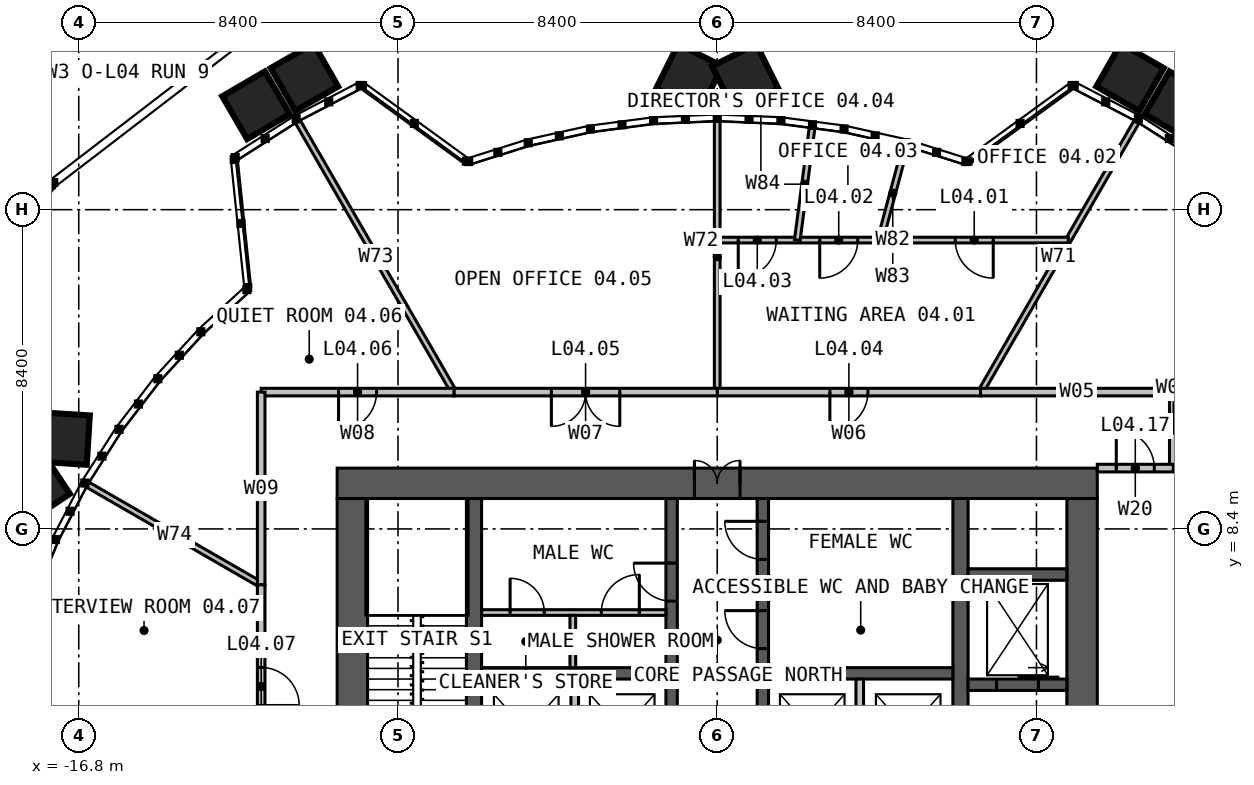
"""IFC4 building model, lengths in metres.
Left out: names, types, materials, properties, quantities, classifications, styles, units other than length and angle.
Written with IfcOpenShell. Run it as: python <this file> out.ifc"""

import sys

from ifc_helpers import new_model, si_unit, direction, frame, frame_2d, origin, place, context, subcontext, project, spatial, rectangle, extrude, element, fill, save


model = new_model("IFC4")
c1 = context("Model", 3, precision=1e-05, world=origin(), true_north=direction((0.0, 1.0)))
c2 = subcontext(c1, "Body", "Model", "MODEL_VIEW")
j1 = project(units=[si_unit("LENGTHUNIT", "METRE"), si_unit("PLANEANGLEUNIT", "RADIAN")], contexts=[c1])
p1 = place(None, origin())
s1 = spatial("IfcSite", under=j1, at=p1, CompositionType="ELEMENT")
p2 = place(p1, origin())
s2 = spatial("IfcBuilding", under=s1, at=p2, CompositionType="ELEMENT")
p3 = place(p2, frame((0.0, 0.0, 21.0)))
s3 = spatial("IfcBuildingStorey", under=s2, at=p3, CompositionType="ELEMENT", Elevation=21.0)
p4 = place(p3, frame((-10.0, 9.6, 0.0), z_axis=(0.0, 0.0, 1.0), x_axis=(1.0, 0.0, 0.0)))
e1 = element("IfcWall", 1, at=p4, inside=s3, PredefinedType="SOLIDWALL", context=c2, shape_type="SweptSolid", body=[
    extrude(rectangle(XDim=20.0, YDim=0.8, at=frame_2d((10.0, 0.0))), origin(), (0.0, 0.0, 1.0), 4.0),
])
p5 = place(p4, frame((9.4, 0.0, 0.0)))
e2 = element("IfcOpeningElement", 2, at=p5, cuts=e1, PredefinedType="OPENING", context=c2, shape_type="SweptSolid", body=[
    extrude(rectangle(XDim=1.2, YDim=2.2, at=frame_2d((0.6, 1.1))), frame((0.0, 0.41, 0.0), z_axis=(0.0, -1.0, 0.0), x_axis=(1.0, 0.0, 0.0)), (0.0, 0.0, 1.0), 0.82),
])
for number, where, z_axis, x_axis in (
    (3, (9.6, -9.2, 0.0), (0.0, 0.0, 1.0), (0.0, 1.0, 0.0)),
    (4, (-9.6, 9.2, 0.0), (0.0, 0.0, 1.0), (0.0, -1.0, 0.0)),
):
    element("IfcWall", number, at=place(p3, frame(where, z_axis=z_axis, x_axis=x_axis)), inside=s3, PredefinedType="SOLIDWALL", context=c2, shape_type="SweptSolid", body=[
        extrude(rectangle(XDim=18.4, YDim=0.8, at=frame_2d((9.2, 0.0))), origin(), (0.0, 0.0, 1.0), 4.0),
    ])
p6 = place(p3, frame((-6.4, -9.2, 0.0), z_axis=(0.0, 0.0, 1.0), x_axis=(0.0, 1.0, 0.0)))
e5 = element("IfcWall", 5, at=p6, inside=s3, PredefinedType="SOLIDWALL", context=c2, shape_type="SweptSolid", body=[
    extrude(rectangle(XDim=18.4, YDim=0.4, at=frame_2d((9.2, 0.0))), origin(), (0.0, 0.0, 1.0), 4.0),
])
p7 = place(p6, frame((8.7, 0.0, 0.0)))
e6 = element("IfcOpeningElement", 6, at=p7, cuts=e5, PredefinedType="OPENING", context=c2, shape_type="SweptSolid", body=[
    extrude(rectangle(XDim=1.0, YDim=2.2, at=frame_2d((0.5, 1.1))), frame((0.0, 0.21, 0.0), z_axis=(0.0, -1.0, 0.0), x_axis=(1.0, 0.0, 0.0)), (0.0, 0.0, 1.0), 0.42),
])
p8 = place(p3, frame((6.4, 9.2, 0.0), z_axis=(0.0, 0.0, 1.0), x_axis=(0.0, -1.0, 0.0)))
e7 = element("IfcWall", 7, at=p8, inside=s3, PredefinedType="SOLIDWALL", context=c2, shape_type="SweptSolid", body=[
    extrude(rectangle(XDim=18.4, YDim=0.4, at=frame_2d((9.2, 0.0))), origin(), (0.0, 0.0, 1.0), 4.0),
])
p9 = place(p8, frame((8.7, 0.0, 0.0)))
e8 = element("IfcOpeningElement", 8, at=p9, cuts=e7, PredefinedType="OPENING", context=c2, shape_type="SweptSolid", body=[
    extrude(rectangle(XDim=1.0, YDim=2.2, at=frame_2d((0.5, 1.1))), frame((0.0, 0.21, 0.0), z_axis=(0.0, -1.0, 0.0), x_axis=(1.0, 0.0, 0.0)), (0.0, 0.0, 1.0), 0.42),
])
for number, where, z_axis, x_axis in (
    (9, (-6.2, 4.6, 0.0), (0.0, 0.0, 1.0), (1.0, 0.0, 0.0)),
    (10, (1.35, 4.6, 0.0), (0.0, 0.0, 1.0), (1.0, 0.0, 0.0)),
):
    element("IfcWall", number, at=place(p3, frame(where, z_axis=z_axis, x_axis=x_axis)), inside=s3, PredefinedType="SOLIDWALL", context=c2, shape_type="SweptSolid", body=[
        extrude(rectangle(XDim=4.85, YDim=0.3, at=frame_2d((2.425, 0.0))), origin(), (0.0, 0.0, 1.0), 4.0),
    ])
p10 = place(p3, frame((-1.2, 1.45, 0.0), z_axis=(0.0, 0.0, 1.0), x_axis=(0.0, 1.0, 0.0)))
e11 = element("IfcWall", 11, at=p10, inside=s3, PredefinedType="SOLIDWALL", context=c2, shape_type="SweptSolid", body=[
    extrude(rectangle(XDim=7.75, YDim=0.3, at=frame_2d((3.875, 0.0))), origin(), (0.0, 0.0, 1.0), 4.0),
])
p11 = place(p10, frame((5.05, 0.0, 0.0)))
e12 = element("IfcOpeningElement", 12, at=p11, cuts=e11, PredefinedType="OPENING", context=c2, shape_type="SweptSolid", body=[
    extrude(rectangle(XDim=1.0, YDim=2.2, at=frame_2d((0.5, 1.1))), frame((0.0, 0.16, 0.0), z_axis=(0.0, -1.0, 0.0), x_axis=(1.0, 0.0, 0.0)), (0.0, 0.0, 1.0), 0.32),
])
p12 = place(p3, frame((1.2, 1.45, 0.0), z_axis=(0.0, 0.0, 1.0), x_axis=(0.0, 1.0, 0.0)))
e13 = element("IfcWall", 13, at=p12, inside=s3, PredefinedType="SOLIDWALL", context=c2, shape_type="SweptSolid", body=[
    extrude(rectangle(XDim=7.75, YDim=0.3, at=frame_2d((3.875, 0.0))), origin(), (0.0, 0.0, 1.0), 4.0),
])
p13 = place(p12, frame((3.8, 0.0, 0.0)))
e14 = element("IfcOpeningElement", 14, at=p13, cuts=e13, PredefinedType="OPENING", context=c2, shape_type="SweptSolid", body=[
    extrude(rectangle(XDim=1.0, YDim=2.2, at=frame_2d((0.5, 1.1))), frame((0.0, 0.16, 0.0), z_axis=(0.0, -1.0, 0.0), x_axis=(1.0, 0.0, 0.0)), (0.0, 0.0, 1.0), 0.32),
])
p14 = place(p12, frame((6.15, 0.0, 0.0)))
e15 = element("IfcOpeningElement", 15, at=p14, cuts=e13, PredefinedType="OPENING", context=c2, shape_type="SweptSolid", body=[
    extrude(rectangle(XDim=1.0, YDim=2.2, at=frame_2d((0.5, 1.1))), frame((0.0, 0.16, 0.0), z_axis=(0.0, -1.0, 0.0), x_axis=(1.0, 0.0, 0.0)), (0.0, 0.0, 1.0), 0.32),
])
p15 = place(p3, frame((6.6, 4.3, 0.0), z_axis=(0.0, 0.0, 1.0), x_axis=(1.0, 0.0, 0.0)))
e16 = element("IfcWall", 16, at=p15, inside=s3, PredefinedType="SOLIDWALL", context=c2, shape_type="SweptSolid", body=[
    extrude(rectangle(XDim=2.6, YDim=0.3, at=frame_2d((1.3, 0.0))), origin(), (0.0, 0.0, 1.0), 4.0),
])
p16 = place(p15, frame((0.75, 0.0, 0.0)))
e17 = element("IfcOpeningElement", 17, at=p16, cuts=e16, PredefinedType="OPENING", context=c2, shape_type="SweptSolid", body=[
    extrude(rectangle(XDim=1.1, YDim=2.2, at=frame_2d((0.55, 1.1))), frame((0.0, 0.16, 0.0), z_axis=(0.0, -1.0, 0.0), x_axis=(1.0, 0.0, 0.0)), (0.0, 0.0, 1.0), 0.32),
])
p17 = place(p3, frame((6.6, 7.2, 0.0), z_axis=(0.0, 0.0, 1.0), x_axis=(1.0, 0.0, 0.0)))
e18 = element("IfcWall", 18, at=p17, inside=s3, PredefinedType="SOLIDWALL", context=c2, shape_type="SweptSolid", body=[
    extrude(rectangle(XDim=2.6, YDim=0.3, at=frame_2d((1.3, 0.0))), origin(), (0.0, 0.0, 1.0), 4.0),
])
for number, where, z_axis, x_axis in (
    (19, (-3.75, 1.75, 0.0), (0.0, 0.0, 1.0), (0.0, 1.0, 0.0)),
    (20, (3.75, 1.75, 0.0), (0.0, 0.0, 1.0), (0.0, 1.0, 0.0)),
):
    element("IfcWall", number, at=place(p3, frame(where, z_axis=z_axis, x_axis=x_axis)), inside=s3, PredefinedType="SOLIDWALL", context=c2, shape_type="SweptSolid", body=[
        extrude(rectangle(XDim=2.7, YDim=0.2, at=frame_2d((1.35, 0.0))), origin(), (0.0, 0.0, 1.0), 3.75),
    ])
p18 = place(p3, frame((1.35, 6.8, 0.0), z_axis=(0.0, 0.0, 1.0), x_axis=(1.0, 0.0, 0.0)))
e21 = element("IfcWall", 21, at=p18, inside=s3, PredefinedType="PARTITIONING", context=c2, shape_type="SweptSolid", body=[
    extrude(rectangle(XDim=4.85, YDim=0.15, at=frame_2d((2.425, 0.0))), origin(), (0.0, 0.0, 1.0), 3.75),
])
p19 = place(p3, frame((-6.2, 6.2, 0.0), z_axis=(0.0, 0.0, 1.0), x_axis=(1.0, 0.0, 0.0)))
e22 = element("IfcWall", 22, at=p19, inside=s3, PredefinedType="PARTITIONING", context=c2, shape_type="SweptSolid", body=[
    extrude(rectangle(XDim=4.85, YDim=0.15, at=frame_2d((2.425, 0.0))), origin(), (0.0, 0.0, 1.0), 3.75),
])
p20 = place(p19, frame((3.15, 0.0, 0.0)))
e23 = element("IfcOpeningElement", 23, at=p20, cuts=e22, PredefinedType="OPENING", context=c2, shape_type="SweptSolid", body=[
    extrude(rectangle(XDim=1.0, YDim=2.2, at=frame_2d((0.5, 1.1))), frame((0.0, 0.085, 0.0), z_axis=(0.0, -1.0, 0.0), x_axis=(1.0, 0.0, 0.0)), (0.0, 0.0, 1.0), 0.17),
])
p21 = place(p19, frame((0.75, 0.0, 0.0)))
e24 = element("IfcOpeningElement", 24, at=p21, cuts=e22, PredefinedType="OPENING", context=c2, shape_type="SweptSolid", body=[
    extrude(rectangle(XDim=0.9, YDim=2.2, at=frame_2d((0.45, 1.1))), frame((0.0, 0.085, 0.0), z_axis=(0.0, -1.0, 0.0), x_axis=(1.0, 0.0, 0.0)), (0.0, 0.0, 1.0), 0.17),
])
p22 = place(p3, frame((-3.8, 4.75, 0.0), z_axis=(0.0, 0.0, 1.0), x_axis=(0.0, 1.0, 0.0)))
e25 = element("IfcWall", 25, at=p22, inside=s3, PredefinedType="PARTITIONING", context=c2, shape_type="SweptSolid", body=[
    extrude(rectangle(XDim=1.375, YDim=0.15, at=frame_2d((0.688, 0.0))), origin(), (0.0, 0.0, 1.0), 3.75),
])
p23 = place(p3, frame((6.928, 12.0, 0.0), z_axis=(0.0, 0.0, 1.0), x_axis=(0.499995243048, 0.866028150195, 0.0)))
e26 = element("IfcWall", 26, at=p23, inside=s3, PredefinedType="PARTITIONING", context=c2, shape_type="SweptSolid", body=[
    extrude(rectangle(XDim=8.212, YDim=0.15, at=frame_2d((4.106, 0.0))), origin(), (0.0, 0.0, 1.0), 2.79),
])
p24 = place(p3, frame((0.0, 12.0, 0.0), z_axis=(0.0, 0.0, 1.0), x_axis=(0.0, 1.0, 0.0)))
e27 = element("IfcWall", 27, at=p24, inside=s3, PredefinedType="PARTITIONING", context=c2, shape_type="SweptSolid", body=[
    extrude(rectangle(XDim=7.124, YDim=0.15, at=frame_2d((3.562, 0.0))), origin(), (0.0, 0.0, 1.0), 2.79),
])
p25 = place(p3, frame((-6.928, 12.0, 0.0), z_axis=(0.0, 0.0, 1.0), x_axis=(-0.499995243048, 0.866028150195, 0.0)))
e28 = element("IfcWall", 28, at=p25, inside=s3, PredefinedType="PARTITIONING", context=c2, shape_type="SweptSolid", body=[
    extrude(rectangle(XDim=8.212, YDim=0.15, at=frame_2d((4.106, 0.0))), origin(), (0.0, 0.0, 1.0), 2.79),
])
p26 = place(p3, frame((-12.0, 6.928, 0.0), z_axis=(0.0, 0.0, 1.0), x_axis=(-0.866029667373, 0.499992615176, 0.0)))
e29 = element("IfcWall", 29, at=p26, inside=s3, PredefinedType="PARTITIONING", context=c2, shape_type="SweptSolid", body=[
    extrude(rectangle(XDim=5.267, YDim=0.15, at=frame_2d((2.634, 0.0))), origin(), (0.0, 0.0, 1.0), 2.79),
])
p27 = place(p3, frame((12.0, 10.0, 0.0), z_axis=(0.0, 0.0, 1.0), x_axis=(0.0, 1.0, 0.0)))
e30 = element("IfcWall", 30, at=p27, inside=s3, PredefinedType="PARTITIONING", context=c2, shape_type="SweptSolid", body=[
    extrude(rectangle(XDim=2.0, YDim=0.2, at=frame_2d((1.0, 0.0))), origin(), (0.0, 0.0, 1.0), 3.8),
])
p28 = place(p3, frame((12.0, 12.0, 0.0), z_axis=(0.0, 0.0, 1.0), x_axis=(-1.0, 0.0, 0.0)))
e31 = element("IfcWall", 31, at=p28, inside=s3, PredefinedType="PARTITIONING", context=c2, shape_type="SweptSolid", body=[
    extrude(rectangle(XDim=5.072, YDim=0.2, at=frame_2d((2.536, 0.0))), origin(), (0.0, 0.0, 1.0), 3.8),
])
p29 = place(p3, frame((9.238, 16.0, 0.0), z_axis=(0.0, 0.0, 1.0), x_axis=(-1.0, 0.0, 0.0)))
e32 = element("IfcWall", 32, at=p29, inside=s3, PredefinedType="PARTITIONING", context=c2, shape_type="SweptSolid", body=[
    extrude(rectangle(XDim=9.238, YDim=0.15, at=frame_2d((4.619, 0.0))), origin(), (0.0, 0.0, 1.0), 2.79),
])
p30 = place(p29, frame((1.975, 0.0, 0.0)))
e33 = element("IfcOpeningElement", 33, at=p30, cuts=e32, PredefinedType="OPENING", context=c2, shape_type="SweptSolid", body=[
    extrude(rectangle(XDim=1.0, YDim=2.2, at=frame_2d((0.5, 1.1))), frame((0.0, 0.085, 0.0), z_axis=(0.0, -1.0, 0.0), x_axis=(1.0, 0.0, 0.0)), (0.0, 0.0, 1.0), 0.17),
])
p31 = place(p29, frame((5.541, 0.0, 0.0)))
e34 = element("IfcOpeningElement", 34, at=p31, cuts=e32, PredefinedType="OPENING", context=c2, shape_type="SweptSolid", body=[
    extrude(rectangle(XDim=1.0, YDim=2.2, at=frame_2d((0.5, 1.1))), frame((0.0, 0.085, 0.0), z_axis=(0.0, -1.0, 0.0), x_axis=(1.0, 0.0, 0.0)), (0.0, 0.0, 1.0), 0.17),
])
p32 = place(p29, frame((7.684, 0.0, 0.0)))
e35 = element("IfcOpeningElement", 35, at=p32, cuts=e32, PredefinedType="OPENING", context=c2, shape_type="SweptSolid", body=[
    extrude(rectangle(XDim=1.0, YDim=2.2, at=frame_2d((0.5, 1.1))), frame((0.0, 0.085, 0.0), z_axis=(0.0, -1.0, 0.0), x_axis=(1.0, 0.0, 0.0)), (0.0, 0.0, 1.0), 0.17),
])
p33 = place(p3, frame((4.287, 16.0, 0.0), z_axis=(0.0, 0.0, 1.0), x_axis=(0.258820329209, 0.965925482213, 0.0)))
e36 = element("IfcWall", 36, at=p33, inside=s3, PredefinedType="PARTITIONING", context=c2, shape_type="SweptSolid", body=[
    extrude(rectangle(XDim=2.559, YDim=0.15, at=frame_2d((1.28, 0.0))), origin(), (0.0, 0.0, 1.0), 2.79),
])
p34 = place(p3, frame((2.106, 16.0, 0.0), z_axis=(0.0, 0.0, 1.0), x_axis=(0.130492822968, 0.991449253948, 0.0)))
e37 = element("IfcWall", 37, at=p34, inside=s3, PredefinedType="PARTITIONING", context=c2, shape_type="SweptSolid", body=[
    extrude(rectangle(XDim=2.967, YDim=0.15, at=frame_2d((1.484, 0.0))), origin(), (0.0, 0.0, 1.0), 2.79),
])
p35 = place(p3, frame((6.928, 12.0, 0.0), z_axis=(0.0, 0.0, 1.0), x_axis=(-1.0, 0.0, 0.0)))
e38 = element("IfcWall", 38, at=p35, inside=s3, PredefinedType="PARTITIONING", context=c2, shape_type="SweptSolid", body=[
    extrude(rectangle(XDim=6.928, YDim=0.2, at=frame_2d((3.464, 0.0))), origin(), (0.0, 0.0, 1.0), 3.8),
])
p36 = place(p35, frame((2.964, 0.0, 0.0)))
e39 = element("IfcOpeningElement", 39, at=p36, cuts=e38, PredefinedType="OPENING", context=c2, shape_type="SweptSolid", body=[
    extrude(rectangle(XDim=1.0, YDim=2.2, at=frame_2d((0.5, 1.1))), frame((0.0, 0.11, 0.0), z_axis=(0.0, -1.0, 0.0), x_axis=(1.0, 0.0, 0.0)), (0.0, 0.0, 1.0), 0.22),
])
p37 = place(p3, frame((0.0, 12.0, 0.0), z_axis=(0.0, 0.0, 1.0), x_axis=(-1.0, 0.0, 0.0)))
e40 = element("IfcWall", 40, at=p37, inside=s3, PredefinedType="PARTITIONING", context=c2, shape_type="SweptSolid", body=[
    extrude(rectangle(XDim=6.928, YDim=0.2, at=frame_2d((3.464, 0.0))), origin(), (0.0, 0.0, 1.0), 3.8),
])
p38 = place(p37, frame((2.564, 0.0, 0.0)))
e41 = element("IfcOpeningElement", 41, at=p38, cuts=e40, PredefinedType="OPENING", context=c2, shape_type="SweptSolid", body=[
    extrude(rectangle(XDim=1.8, YDim=2.2, at=frame_2d((0.9, 1.1))), frame((0.0, 0.11, 0.0), z_axis=(0.0, -1.0, 0.0), x_axis=(1.0, 0.0, 0.0)), (0.0, 0.0, 1.0), 0.22),
])
p39 = place(p3, frame((-6.928, 12.0, 0.0), z_axis=(0.0, 0.0, 1.0), x_axis=(-1.0, 0.0, 0.0)))
e42 = element("IfcWall", 42, at=p39, inside=s3, PredefinedType="PARTITIONING", context=c2, shape_type="SweptSolid", body=[
    extrude(rectangle(XDim=5.072, YDim=0.2, at=frame_2d((2.536, 0.0))), origin(), (0.0, 0.0, 1.0), 3.8),
])
p40 = place(p39, frame((2.036, 0.0, 0.0)))
e43 = element("IfcOpeningElement", 43, at=p40, cuts=e42, PredefinedType="OPENING", context=c2, shape_type="SweptSolid", body=[
    extrude(rectangle(XDim=1.0, YDim=2.2, at=frame_2d((0.5, 1.1))), frame((0.0, 0.11, 0.0), z_axis=(0.0, -1.0, 0.0), x_axis=(1.0, 0.0, 0.0)), (0.0, 0.0, 1.0), 0.22),
])
p41 = place(p3, frame((-12.0, 12.0, 0.0), z_axis=(0.0, 0.0, 1.0), x_axis=(0.0, -1.0, 0.0)))
e44 = element("IfcWall", 44, at=p41, inside=s3, PredefinedType="PARTITIONING", context=c2, shape_type="SweptSolid", body=[
    extrude(rectangle(XDim=5.072, YDim=0.2, at=frame_2d((2.536, 0.0))), origin(), (0.0, 0.0, 1.0), 3.8),
])
p42 = place(p3, frame((-12.0, 6.928, 0.0), z_axis=(0.0, 0.0, 1.0), x_axis=(0.0, -1.0, 0.0)))
e45 = element("IfcWall", 45, at=p42, inside=s3, PredefinedType="PARTITIONING", context=c2, shape_type="SweptSolid", body=[
    extrude(rectangle(XDim=5.348, YDim=0.2, at=frame_2d((2.674, 0.0))), origin(), (0.0, 0.0, 1.0), 3.8),
])
p43 = place(p42, frame((2.174, 0.0, 0.0)))
e46 = element("IfcOpeningElement", 46, at=p43, cuts=e45, PredefinedType="OPENING", context=c2, shape_type="SweptSolid", body=[
    extrude(rectangle(XDim=1.0, YDim=2.2, at=frame_2d((0.5, 1.1))), frame((0.0, 0.11, 0.0), z_axis=(0.0, -1.0, 0.0), x_axis=(1.0, 0.0, 0.0)), (0.0, 0.0, 1.0), 0.22),
])
p44 = place(p3, frame((10.0, 10.0, 0.0), z_axis=(0.0, 0.0, 1.0), x_axis=(1.0, 0.0, 0.0)))
e47 = element("IfcWall", 47, at=p44, inside=s3, PredefinedType="PARTITIONING", context=c2, shape_type="SweptSolid", body=[
    extrude(rectangle(XDim=2.0, YDim=0.2, at=frame_2d((1.0, 0.0))), origin(), (0.0, 0.0, 1.0), 3.8),
])
p45 = place(p44, frame((0.5, 0.0, 0.0)))
e48 = element("IfcOpeningElement", 48, at=p45, cuts=e47, PredefinedType="OPENING", context=c2, shape_type="SweptSolid", body=[
    extrude(rectangle(XDim=1.0, YDim=2.2, at=frame_2d((0.5, 1.1))), frame((0.0, 0.11, 0.0), z_axis=(0.0, -1.0, 0.0), x_axis=(1.0, 0.0, 0.0)), (0.0, 0.0, 1.0), 0.22),
])
p46 = place(p5, origin())
e49 = element("IfcDoor", 49, at=p46, inside=s3, OperationType="DOUBLE_DOOR_SINGLE_SWING", PredefinedType="DOOR", context=c2, shape_type="SweptSolid", body=[
    extrude(rectangle(XDim=1.2, YDim=2.2, at=frame_2d((0.6, 1.1))), frame((0.0, 0.025, 0.0), z_axis=(0.0, -1.0, 0.0), x_axis=(1.0, 0.0, 0.0)), (0.0, 0.0, 1.0), 0.05),
])
fill(e2, e49)
p47 = place(p11, origin())
e50 = element("IfcDoor", 50, at=p47, inside=s3, OperationType="SINGLE_SWING_RIGHT", PredefinedType="DOOR", context=c2, shape_type="SweptSolid", body=[
    extrude(rectangle(XDim=1.0, YDim=2.2, at=frame_2d((0.5, 1.1))), frame((0.0, 0.025, 0.0), z_axis=(0.0, -1.0, 0.0), x_axis=(1.0, 0.0, 0.0)), (0.0, 0.0, 1.0), 0.05),
])
fill(e12, e50)
p48 = place(p13, origin())
e51 = element("IfcDoor", 51, at=p48, inside=s3, OperationType="SINGLE_SWING_RIGHT", PredefinedType="DOOR", context=c2, shape_type="SweptSolid", body=[
    extrude(rectangle(XDim=1.0, YDim=2.2, at=frame_2d((0.5, 1.1))), frame((0.0, 0.025, 0.0), z_axis=(0.0, -1.0, 0.0), x_axis=(1.0, 0.0, 0.0)), (0.0, 0.0, 1.0), 0.05),
])
fill(e14, e51)
p49 = place(p14, origin())
e52 = element("IfcDoor", 52, at=p49, inside=s3, OperationType="SINGLE_SWING_RIGHT", PredefinedType="DOOR", context=c2, shape_type="SweptSolid", body=[
    extrude(rectangle(XDim=1.0, YDim=2.2, at=frame_2d((0.5, 1.1))), frame((0.0, 0.025, 0.0), z_axis=(0.0, -1.0, 0.0), x_axis=(1.0, 0.0, 0.0)), (0.0, 0.0, 1.0), 0.05),
])
fill(e15, e52)
p50 = place(p20, origin())
e53 = element("IfcDoor", 53, at=p50, inside=s3, OperationType="SINGLE_SWING_RIGHT", PredefinedType="DOOR", context=c2, shape_type="SweptSolid", body=[
    extrude(rectangle(XDim=1.0, YDim=2.2, at=frame_2d((0.5, 1.1))), frame((0.0, 0.025, 0.0), z_axis=(0.0, -1.0, 0.0), x_axis=(1.0, 0.0, 0.0)), (0.0, 0.0, 1.0), 0.05),
])
fill(e23, e53)
p51 = place(p21, origin())
e54 = element("IfcDoor", 54, at=p51, inside=s3, OperationType="SINGLE_SWING_LEFT", PredefinedType="DOOR", context=c2, shape_type="SweptSolid", body=[
    extrude(rectangle(XDim=0.9, YDim=2.2, at=frame_2d((0.45, 1.1))), frame((0.0, 0.025, 0.0), z_axis=(0.0, -1.0, 0.0), x_axis=(1.0, 0.0, 0.0)), (0.0, 0.0, 1.0), 0.05),
])
fill(e24, e54)
p52 = place(p16, origin())
e55 = element("IfcDoor", 55, at=p52, inside=s3, OperationType="SLIDING_TO_LEFT", PredefinedType="DOOR", context=c2, shape_type="SweptSolid", body=[
    extrude(rectangle(XDim=1.1, YDim=2.2, at=frame_2d((0.55, 1.1))), frame((0.0, 0.025, 0.0), z_axis=(0.0, -1.0, 0.0), x_axis=(1.0, 0.0, 0.0)), (0.0, 0.0, 1.0), 0.05),
])
fill(e17, e55)
p53 = place(p30, origin())
e56 = element("IfcDoor", 56, at=p53, inside=s3, OperationType="SINGLE_SWING_LEFT", PredefinedType="DOOR", context=c2, shape_type="SweptSolid", body=[
    extrude(rectangle(XDim=1.0, YDim=2.2, at=frame_2d((0.5, 1.1))), frame((0.0, 0.025, 0.0), z_axis=(0.0, -1.0, 0.0), x_axis=(1.0, 0.0, 0.0)), (0.0, 0.0, 1.0), 0.05),
])
fill(e33, e56)
p54 = place(p31, origin())
e57 = element("IfcDoor", 57, at=p54, inside=s3, OperationType="SINGLE_SWING_RIGHT", PredefinedType="DOOR", context=c2, shape_type="SweptSolid", body=[
    extrude(rectangle(XDim=1.0, YDim=2.2, at=frame_2d((0.5, 1.1))), frame((0.0, 0.025, 0.0), z_axis=(0.0, -1.0, 0.0), x_axis=(1.0, 0.0, 0.0)), (0.0, 0.0, 1.0), 0.05),
])
fill(e34, e57)
p55 = place(p32, origin())
e58 = element("IfcDoor", 58, at=p55, inside=s3, OperationType="SINGLE_SWING_RIGHT", PredefinedType="DOOR", context=c2, shape_type="SweptSolid", body=[
    extrude(rectangle(XDim=1.0, YDim=2.2, at=frame_2d((0.5, 1.1))), frame((0.0, 0.025, 0.0), z_axis=(0.0, -1.0, 0.0), x_axis=(1.0, 0.0, 0.0)), (0.0, 0.0, 1.0), 0.05),
])
fill(e35, e58)
p56 = place(p36, origin())
e59 = element("IfcDoor", 59, at=p56, inside=s3, OperationType="SINGLE_SWING_RIGHT", PredefinedType="DOOR", context=c2, shape_type="SweptSolid", body=[
    extrude(rectangle(XDim=1.0, YDim=2.2, at=frame_2d((0.5, 1.1))), frame((0.0, 0.025, 0.0), z_axis=(0.0, -1.0, 0.0), x_axis=(1.0, 0.0, 0.0)), (0.0, 0.0, 1.0), 0.05),
])
fill(e39, e59)
p57 = place(p38, origin())
e60 = element("IfcDoor", 60, at=p57, inside=s3, OperationType="DOUBLE_DOOR_SINGLE_SWING", PredefinedType="DOOR", context=c2, shape_type="SweptSolid", body=[
    extrude(rectangle(XDim=1.8, YDim=2.2, at=frame_2d((0.9, 1.1))), frame((0.0, 0.025, 0.0), z_axis=(0.0, -1.0, 0.0), x_axis=(1.0, 0.0, 0.0)), (0.0, 0.0, 1.0), 0.05),
])
fill(e41, e60)
p58 = place(p40, origin())
e61 = element("IfcDoor", 61, at=p58, inside=s3, OperationType="SINGLE_SWING_RIGHT", PredefinedType="DOOR", context=c2, shape_type="SweptSolid", body=[
    extrude(rectangle(XDim=1.0, YDim=2.2, at=frame_2d((0.5, 1.1))), frame((0.0, 0.025, 0.0), z_axis=(0.0, -1.0, 0.0), x_axis=(1.0, 0.0, 0.0)), (0.0, 0.0, 1.0), 0.05),
])
fill(e43, e61)
p59 = place(p43, origin())
e62 = element("IfcDoor", 62, at=p59, inside=s3, OperationType="SINGLE_SWING_RIGHT", PredefinedType="DOOR", context=c2, shape_type="SweptSolid", body=[
    extrude(rectangle(XDim=1.0, YDim=2.2, at=frame_2d((0.5, 1.1))), frame((0.0, 0.025, 0.0), z_axis=(0.0, -1.0, 0.0), x_axis=(1.0, 0.0, 0.0)), (0.0, 0.0, 1.0), 0.05),
])
fill(e46, e62)
p60 = place(p45, origin())
e63 = element("IfcDoor", 63, at=p60, inside=s3, OperationType="SINGLE_SWING_LEFT", PredefinedType="DOOR", context=c2, shape_type="SweptSolid", body=[
    extrude(rectangle(XDim=1.0, YDim=2.2, at=frame_2d((0.5, 1.1))), frame((0.0, 0.025, 0.0), z_axis=(0.0, -1.0, 0.0), x_axis=(1.0, 0.0, 0.0)), (0.0, 0.0, 1.0), 0.05),
])
fill(e48, e63)
save(model, sys.argv[1])
